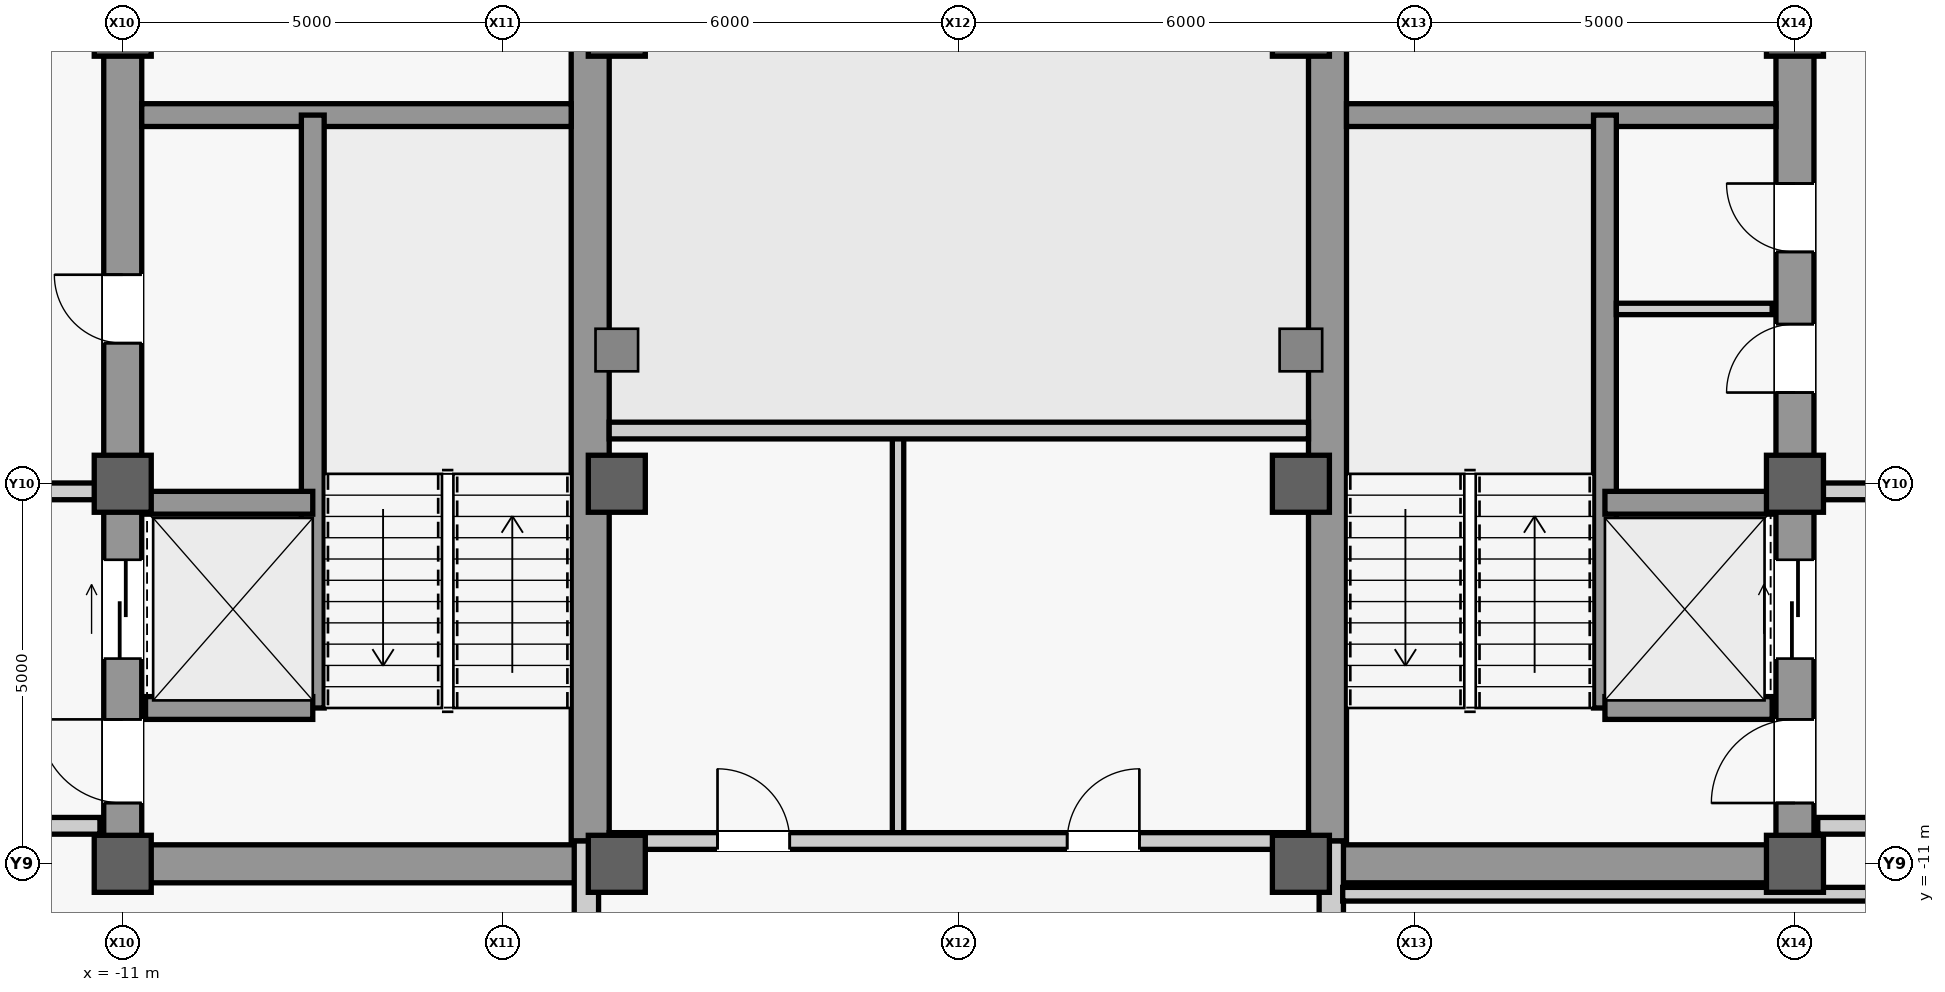
"""IFC4 building model, lengths in metres.
Left out: names, types, materials, properties, quantities, classifications, styles, units other than length and angle.
Written with IfcOpenShell. Run it as: python <this file> out.ifc"""

import sys

from ifc_helpers import new_model, si_unit, direction, frame, frame_2d, origin, origin_2d, place, context, subcontext, project, spatial, rectangle, extrude, source, transform, mapped, element, fill, save


model = new_model("IFC4")
c1 = context("Model", 3, precision=1e-05, world=origin(), true_north=direction((0.0, 1.0)))
c2 = subcontext(c1, "Body", "Model", "MODEL_VIEW")
j1 = project(units=[si_unit("LENGTHUNIT", "METRE"), si_unit("PLANEANGLEUNIT", "RADIAN")], contexts=[c1])
p1 = place(None, origin())
s1 = spatial("IfcSite", under=j1, at=p1, CompositionType="ELEMENT")
p2 = place(p1, origin())
s2 = spatial("IfcBuilding", under=s1, at=p2, CompositionType="ELEMENT")
p3 = place(p2, frame((0.0, 0.0, 346.3)))
s3 = spatial("IfcBuildingStorey", under=s2, at=p3, CompositionType="ELEMENT", Elevation=346.3)
m1 = source(origin(), c2, "Body", "SweptSolid", [
    extrude(rectangle(XDim=22.0, YDim=0.5, at=frame_2d((11.0, 0.0))), origin(), (0.0, 0.0, 1.0), 3.74),
])
p4 = place(p3, frame((-11.0, -11.0, 0.0), z_axis=(0.0, 0.0, 1.0), x_axis=(0.0, 1.0, 0.0)))
e1 = element("IfcWall", 1, at=p4, inside=s3, PredefinedType="SHEAR", context=c2, shape_type="MappedRepresentation", body=[
    mapped(m1, transform((0.0, 0.0, 0.0), scale=1.0)),
])
m2 = source(origin(), c2, "Body", "SweptSolid", [
    extrude(rectangle(XDim=1.1, YDim=2.2, at=frame_2d((0.55, 1.1))), frame((0.0, 0.26, 0.0), z_axis=(0.0, -1.0, 0.0), x_axis=(1.0, 0.0, 0.0)), (0.0, 0.0, 1.0), 0.52),
])
p5 = place(p4, frame((0.8, 0.0, 0.0)))
e2 = element("IfcOpeningElement", 2, at=p5, cuts=e1, PredefinedType="OPENING", context=c2, shape_type="MappedRepresentation", body=[
    mapped(m2, transform((0.0, 0.0, 0.0), scale=1.0)),
])
p6 = place(p4, frame((12.5, 0.0, 0.0)))
e3 = element("IfcOpeningElement", 3, at=p6, cuts=e1, PredefinedType="OPENING", context=c2, shape_type="MappedRepresentation", body=[
    mapped(m2, transform((0.0, 0.0, 0.0), scale=1.0)),
])
m3 = source(origin(), c2, "Body", "SweptSolid", [
    extrude(rectangle(XDim=0.9, YDim=2.15, at=frame_2d((0.45, 1.075))), frame((0.0, 0.26, 0.0), z_axis=(0.0, -1.0, 0.0), x_axis=(1.0, 0.0, 0.0)), (0.0, 0.0, 1.0), 0.52),
])
p7 = place(p4, frame((6.85, 0.0, 0.0)))
e4 = element("IfcOpeningElement", 4, at=p7, cuts=e1, PredefinedType="OPENING", context=c2, shape_type="MappedRepresentation", body=[
    mapped(m3, transform((0.0, 0.0, 0.0), scale=1.0)),
])
m4 = source(origin(), c2, "Body", "SweptSolid", [
    extrude(rectangle(XDim=1.2, YDim=2.3, at=frame_2d((0.6, 1.15))), frame((0.0, 0.26, 0.0), z_axis=(0.0, -1.0, 0.0), x_axis=(1.0, 0.0, 0.0)), (0.0, 0.0, 1.0), 0.52),
])
p8 = place(p4, frame((14.6, 0.0, 0.0)))
e5 = element("IfcOpeningElement", 5, at=p8, cuts=e1, PredefinedType="OPENING", context=c2, shape_type="MappedRepresentation", body=[
    mapped(m4, transform((0.0, 0.0, 0.0), scale=1.0)),
])
p9 = place(p4, frame((18.2, 0.0, 0.0)))
e6 = element("IfcOpeningElement", 6, at=p9, cuts=e1, PredefinedType="OPENING", context=c2, shape_type="MappedRepresentation", body=[
    mapped(m4, transform((0.0, 0.0, 0.0), scale=1.0)),
])
m5 = source(origin(), c2, "Body", "SweptSolid", [
    extrude(rectangle(XDim=1.3, YDim=2.3, at=frame_2d((0.65, 1.15))), frame((0.0, 0.26, 0.0), z_axis=(0.0, -1.0, 0.0), x_axis=(1.0, 0.0, 0.0)), (0.0, 0.0, 1.0), 0.52),
])
p10 = place(p4, frame((2.7, 0.0, 0.0)))
e7 = element("IfcOpeningElement", 7, at=p10, cuts=e1, PredefinedType="OPENING", context=c2, shape_type="MappedRepresentation", body=[
    mapped(m5, transform((0.0, 0.0, 0.0), scale=1.0)),
])
p11 = place(p3, frame((11.0, -11.0, 0.0), z_axis=(0.0, 0.0, 1.0), x_axis=(0.0, 1.0, 0.0)))
e8 = element("IfcWall", 8, at=p11, inside=s3, PredefinedType="SHEAR", context=c2, shape_type="MappedRepresentation", body=[
    mapped(m1, transform((0.0, 0.0, 0.0), scale=1.0)),
])
p12 = place(p11, frame((0.8, 0.0, 0.0)))
e9 = element("IfcOpeningElement", 9, at=p12, cuts=e8, PredefinedType="OPENING", context=c2, shape_type="MappedRepresentation", body=[
    mapped(m2, transform((0.0, 0.0, 0.0), scale=1.0)),
])
p13 = place(p11, frame((6.2, 0.0, 0.0)))
e10 = element("IfcOpeningElement", 10, at=p13, cuts=e8, PredefinedType="OPENING", context=c2, shape_type="MappedRepresentation", body=[
    mapped(m3, transform((0.0, 0.0, 0.0), scale=1.0)),
])
p14 = place(p11, frame((8.05, 0.0, 0.0)))
e11 = element("IfcOpeningElement", 11, at=p14, cuts=e8, PredefinedType="OPENING", context=c2, shape_type="MappedRepresentation", body=[
    mapped(m3, transform((0.0, 0.0, 0.0), scale=1.0)),
])
p15 = place(p11, frame((17.6, 0.0, 0.0)))
e12 = element("IfcOpeningElement", 12, at=p15, cuts=e8, PredefinedType="OPENING", context=c2, shape_type="MappedRepresentation", body=[
    mapped(m4, transform((0.0, 0.0, 0.0), scale=1.0)),
])
p16 = place(p11, frame((19.6, 0.0, 0.0)))
e13 = element("IfcOpeningElement", 13, at=p16, cuts=e8, PredefinedType="OPENING", context=c2, shape_type="MappedRepresentation", body=[
    mapped(m4, transform((0.0, 0.0, 0.0), scale=1.0)),
])
p17 = place(p11, frame((2.7, 0.0, 0.0)))
e14 = element("IfcOpeningElement", 14, at=p17, cuts=e8, PredefinedType="OPENING", context=c2, shape_type="MappedRepresentation", body=[
    mapped(m5, transform((0.0, 0.0, 0.0), scale=1.0)),
])
p18 = place(p11, frame((13.35, 0.0, 0.0)))
e15 = element("IfcOpeningElement", 15, at=p18, cuts=e8, PredefinedType="OPENING", context=c2, shape_type="MappedRepresentation", body=[
    mapped(m5, transform((0.0, 0.0, 0.0), scale=1.0)),
])
m6 = source(origin(), c2, "Body", "SweptSolid", [
    extrude(rectangle(XDim=21.4, YDim=0.5, at=frame_2d((10.7, 0.0))), origin(), (0.0, 0.0, 1.0), 3.74),
])
for number, where, z_axis, x_axis in (
    (16, (-4.85, -10.7, 0.0), (0.0, 0.0, 1.0), (0.0, 1.0, 0.0)),
    (17, (4.85, -10.7, 0.0), (0.0, 0.0, 1.0), (0.0, 1.0, 0.0)),
):
    element("IfcWall", number, at=place(p3, frame(where, z_axis=z_axis, x_axis=x_axis)), inside=s3, PredefinedType="SHEAR", context=c2, shape_type="MappedRepresentation", body=[
        mapped(m6, transform((0.0, 0.0, 0.0), scale=1.0)),
    ])
m7 = source(origin(), c2, "Body", "SweptSolid", [
    extrude(rectangle(XDim=5.9, YDim=0.5, at=frame_2d((2.95, 0.0))), origin(), (0.0, 0.0, 1.0), 3.74),
])
for number, where, z_axis, x_axis in (
    (18, (-10.75, -11.0, 0.0), (0.0, 0.0, 1.0), (1.0, 0.0, 0.0)),
    (19, (4.85, -11.0, 0.0), (0.0, 0.0, 1.0), (1.0, 0.0, 0.0)),
):
    element("IfcWall", number, at=place(p3, frame(where, z_axis=z_axis, x_axis=x_axis)), inside=s3, PredefinedType="SHEAR", context=c2, shape_type="MappedRepresentation", body=[
        mapped(m7, transform((0.0, 0.0, 0.0), scale=1.0)),
    ])
m8 = source(origin(), c2, "Body", "SweptSolid", [
    extrude(rectangle(XDim=5.65, YDim=0.3, at=frame_2d((2.825, 0.0))), origin(), (0.0, 0.0, 1.0), 3.74),
])
for number, where, z_axis, x_axis in (
    (20, (-10.75, -1.15, 0.0), (0.0, 0.0, 1.0), (1.0, 0.0, 0.0)),
    (21, (5.1, -1.15, 0.0), (0.0, 0.0, 1.0), (1.0, 0.0, 0.0)),
):
    element("IfcWall", number, at=place(p3, frame(where, z_axis=z_axis, x_axis=x_axis)), inside=s3, PredefinedType="SHEAR", context=c2, shape_type="MappedRepresentation", body=[
        mapped(m8, transform((0.0, 0.0, 0.0), scale=1.0)),
    ])
m9 = source(origin(), c2, "Body", "SweptSolid", [
    extrude(rectangle(XDim=0.75, YDim=0.75, at=origin_2d()), origin(), (0.0, 0.0, 1.0), 4.0),
])
for number, where, z_axis, x_axis in (
    (22, (-11.0, -11.0, 0.0), (0.0, 0.0, 1.0), (1.0, 0.0, 0.0)),
    (23, (-11.0, -6.0, 0.0), (0.0, 0.0, 1.0), (1.0, 0.0, 0.0)),
    (24, (-11.0, 0.0, 0.0), (0.0, 0.0, 1.0), (1.0, 0.0, 0.0)),
    (25, (-4.5, -11.0, 0.0), (0.0, 0.0, 1.0), (1.0, 0.0, 0.0)),
    (26, (-4.5, -6.0, 0.0), (0.0, 0.0, 1.0), (1.0, 0.0, 0.0)),
    (27, (-4.5, 0.0, 0.0), (0.0, 0.0, 1.0), (1.0, 0.0, 0.0)),
    (28, (4.5, -11.0, 0.0), (0.0, 0.0, 1.0), (1.0, 0.0, 0.0)),
    (29, (4.5, -6.0, 0.0), (0.0, 0.0, 1.0), (1.0, 0.0, 0.0)),
    (30, (4.5, 0.0, 0.0), (0.0, 0.0, 1.0), (1.0, 0.0, 0.0)),
    (31, (11.0, -11.0, 0.0), (0.0, 0.0, 1.0), (1.0, 0.0, 0.0)),
    (32, (11.0, -6.0, 0.0), (0.0, 0.0, 1.0), (1.0, 0.0, 0.0)),
    (33, (11.0, 0.0, 0.0), (0.0, 0.0, 1.0), (1.0, 0.0, 0.0)),
):
    element("IfcColumn", number, at=place(p3, frame(where, z_axis=z_axis, x_axis=x_axis)), inside=s3, PredefinedType="COLUMN", context=c2, shape_type="MappedRepresentation", body=[
        mapped(m9, transform((0.0, 0.0, 0.0), scale=1.0)),
    ])
m10 = source(origin(), c2, "Body", "SweptSolid", [
    extrude(rectangle(XDim=14.98, YDim=0.32, at=frame_2d((7.49, 0.0))), origin(), (0.0, 0.0, 1.0), 3.045),
])
for number, where, z_axis, x_axis in (
    (34, (-4.9, -25.68, 0.0), (0.0, 0.0, 1.0), (0.0, 1.0, 0.0)),
    (35, (4.9, -25.68, 0.0), (0.0, 0.0, 1.0), (0.0, 1.0, 0.0)),
):
    element("IfcWall", number, at=place(p3, frame(where, z_axis=z_axis, x_axis=x_axis)), inside=s3, PredefinedType="STANDARD", context=c2, shape_type="MappedRepresentation", body=[
        mapped(m10, transform((0.0, 0.0, 0.0), scale=1.0)),
    ])
m11 = source(origin(), c2, "Body", "SweptSolid", [
    extrude(rectangle(XDim=7.8, YDim=0.3, at=frame_2d((3.9, 0.0))), origin(), (0.0, 0.0, 1.0), 3.74),
])
p19 = place(p3, frame((-8.5, -8.95, 0.0), z_axis=(0.0, 0.0, 1.0), x_axis=(0.0, 1.0, 0.0)))
e36 = element("IfcWall", 36, at=p19, inside=s3, PredefinedType="SHEAR", context=c2, shape_type="MappedRepresentation", body=[
    mapped(m11, transform((0.0, 0.0, 0.0), scale=1.0)),
])
m12 = source(origin(), c2, "Body", "SweptSolid", [
    extrude(rectangle(XDim=2.2, YDim=0.3, at=frame_2d((1.1, 0.0))), origin(), (0.0, 0.0, 1.0), 3.74),
])
for number, where, z_axis, x_axis in (
    (37, (-10.7, -8.95, 0.0), (0.0, 0.0, 1.0), (1.0, 0.0, 0.0)),
    (38, (-10.7, -6.25, 0.0), (0.0, 0.0, 1.0), (1.0, 0.0, 0.0)),
):
    element("IfcWall", number, at=place(p3, frame(where, z_axis=z_axis, x_axis=x_axis)), inside=s3, PredefinedType="SHEAR", context=c2, shape_type="MappedRepresentation", body=[
        mapped(m12, transform((0.0, 0.0, 0.0), scale=1.0)),
    ])
p20 = place(p3, frame((8.5, -8.95, 0.0), z_axis=(0.0, 0.0, 1.0), x_axis=(0.0, 1.0, 0.0)))
e39 = element("IfcWall", 39, at=p20, inside=s3, PredefinedType="SHEAR", context=c2, shape_type="MappedRepresentation", body=[
    mapped(m11, transform((0.0, 0.0, 0.0), scale=1.0)),
])
for number, where, z_axis, x_axis in (
    (40, (8.5, -8.95, 0.0), (0.0, 0.0, 1.0), (1.0, 0.0, 0.0)),
    (41, (8.5, -6.25, 0.0), (0.0, 0.0, 1.0), (1.0, 0.0, 0.0)),
):
    element("IfcWall", number, at=place(p3, frame(where, z_axis=z_axis, x_axis=x_axis)), inside=s3, PredefinedType="SHEAR", context=c2, shape_type="MappedRepresentation", body=[
        mapped(m12, transform((0.0, 0.0, 0.0), scale=1.0)),
    ])
m13 = source(origin(), c2, "Body", "SweptSolid", [
    extrude(rectangle(XDim=2.05, YDim=0.15, at=frame_2d((1.025, 0.0))), origin(), (0.0, 0.0, 1.0), 3.74),
])
p21 = place(p3, frame((8.65, -3.7, 0.0), z_axis=(0.0, 0.0, 1.0), x_axis=(1.0, 0.0, 0.0)))
e42 = element("IfcWall", 42, at=p21, inside=s3, PredefinedType="PARTITIONING", context=c2, shape_type="MappedRepresentation", body=[
    mapped(m13, transform((0.0, 0.0, 0.0), scale=1.0)),
])
m14 = source(origin(), c2, "Body", "SweptSolid", [
    extrude(rectangle(XDim=4.05, YDim=0.22, at=frame_2d((2.025, 0.0))), origin(), (0.0, 0.0, 1.0), 3.74),
])
p22 = place(p3, frame((-15.35, -10.5, 0.0), z_axis=(0.0, 0.0, 1.0), x_axis=(1.0, 0.0, 0.0)))
e43 = element("IfcWall", 43, at=p22, inside=s3, PredefinedType="PARTITIONING", context=c2, shape_type="MappedRepresentation", body=[
    mapped(m14, transform((0.0, 0.0, 0.0), scale=1.0)),
])
m15 = source(origin(), c2, "Body", "SweptSolid", [
    extrude(rectangle(XDim=4.05, YDim=0.22, at=frame_2d((2.025, 0.0))), origin(), (0.0, 0.0, 1.0), 3.124),
])
p23 = place(p3, frame((-15.35, -6.1, 0.0), z_axis=(0.0, 0.0, 1.0), x_axis=(1.0, 0.0, 0.0)))
e44 = element("IfcWall", 44, at=p23, inside=s3, PredefinedType="PARTITIONING", context=c2, shape_type="MappedRepresentation", body=[
    mapped(m15, transform((0.0, 0.0, 0.0), scale=1.0)),
])
p24 = place(p3, frame((11.3, -10.5, 0.0), z_axis=(0.0, 0.0, 1.0), x_axis=(1.0, 0.0, 0.0)))
e45 = element("IfcWall", 45, at=p24, inside=s3, PredefinedType="PARTITIONING", context=c2, shape_type="MappedRepresentation", body=[
    mapped(m14, transform((0.0, 0.0, 0.0), scale=1.0)),
])
p25 = place(p3, frame((11.3, -6.1, 0.0), z_axis=(0.0, 0.0, 1.0), x_axis=(1.0, 0.0, 0.0)))
e46 = element("IfcWall", 46, at=p25, inside=s3, PredefinedType="PARTITIONING", context=c2, shape_type="MappedRepresentation", body=[
    mapped(m15, transform((0.0, 0.0, 0.0), scale=1.0)),
])
m16 = source(origin(), c2, "Body", "SweptSolid", [
    extrude(rectangle(XDim=5.4, YDim=0.15, at=frame_2d((2.7, 0.0))), origin(), (0.0, 0.0, 1.0), 3.74),
])
p26 = place(p3, frame((-0.8, -10.7, 0.0), z_axis=(0.0, 0.0, 1.0), x_axis=(0.0, 1.0, 0.0)))
e47 = element("IfcWall", 47, at=p26, inside=s3, PredefinedType="PARTITIONING", context=c2, shape_type="MappedRepresentation", body=[
    mapped(m16, transform((0.0, 0.0, 0.0), scale=1.0)),
])
m17 = source(origin(), c2, "Body", "SweptSolid", [
    extrude(rectangle(XDim=9.2, YDim=0.22, at=frame_2d((4.6, 0.0))), origin(), (0.0, 0.0, 1.0), 3.74),
])
p27 = place(p3, frame((-4.6, -10.7, 0.0), z_axis=(0.0, 0.0, 1.0), x_axis=(1.0, 0.0, 0.0)))
e48 = element("IfcWall", 48, at=p27, inside=s3, PredefinedType="PARTITIONING", context=c2, shape_type="MappedRepresentation", body=[
    mapped(m17, transform((0.0, 0.0, 0.0), scale=1.0)),
])
m18 = source(origin(), c2, "Body", "SweptSolid", [
    extrude(rectangle(XDim=0.95, YDim=2.15, at=frame_2d((0.475, 1.075))), frame((0.0, 0.12, 0.0), z_axis=(0.0, -1.0, 0.0), x_axis=(1.0, 0.0, 0.0)), (0.0, 0.0, 1.0), 0.24),
])
p28 = place(p27, frame((1.425, 0.0, 0.0)))
e49 = element("IfcOpeningElement", 49, at=p28, cuts=e48, PredefinedType="OPENING", context=c2, shape_type="MappedRepresentation", body=[
    mapped(m18, transform((0.0, 0.0, 0.0), scale=1.0)),
])
p29 = place(p27, frame((6.025, 0.0, 0.0)))
e50 = element("IfcOpeningElement", 50, at=p29, cuts=e48, PredefinedType="OPENING", context=c2, shape_type="MappedRepresentation", body=[
    mapped(m18, transform((0.0, 0.0, 0.0), scale=1.0)),
])
p30 = place(p3, frame((-4.6, -5.3, 0.0), z_axis=(0.0, 0.0, 1.0), x_axis=(1.0, 0.0, 0.0)))
e51 = element("IfcWall", 51, at=p30, inside=s3, PredefinedType="PARTITIONING", context=c2, shape_type="MappedRepresentation", body=[
    mapped(m17, transform((0.0, 0.0, 0.0), scale=1.0)),
])
m19 = source(origin(), c2, "Body", "SweptSolid", [
    extrude(rectangle(XDim=12.7, YDim=0.18, at=frame_2d((6.35, 0.0))), origin(), (0.0, 0.0, 1.0), 2.79),
])
p31 = place(p3, frame((5.05, -11.4, 0.0), z_axis=(0.0, 0.0, 1.0), x_axis=(1.0, 0.0, 0.0)))
e52 = element("IfcWall", 52, at=p31, inside=s3, PredefinedType="PARTITIONING", context=c2, shape_type="MappedRepresentation", body=[
    mapped(m19, transform((0.0, 0.0, 0.0), scale=1.0)),
])
m20 = source(origin(), c2, "Body", "SweptSolid", [
    extrude(rectangle(XDim=1.05, YDim=2.2, at=frame_2d((0.525, 1.1))), frame((0.0, 0.1, 0.0), z_axis=(0.0, -1.0, 0.0), x_axis=(1.0, 0.0, 0.0)), (0.0, 0.0, 1.0), 0.2),
])
p32 = place(p31, frame((10.975, 0.0, 0.0)))
e53 = element("IfcOpeningElement", 53, at=p32, cuts=e52, PredefinedType="OPENING", context=c2, shape_type="MappedRepresentation", body=[
    mapped(m20, transform((0.0, 0.0, 0.0), scale=1.0)),
])
m21 = source(origin(), c2, "Body", "SweptSolid", [
    extrude(rectangle(XDim=1.1, YDim=2.2, at=frame_2d((0.55, 1.1))), frame((0.0, 0.025, 0.0), z_axis=(0.0, -1.0, 0.0), x_axis=(1.0, 0.0, 0.0)), (0.0, 0.0, 1.0), 0.05),
])
p33 = place(p5, origin())
e54 = element("IfcDoor", 54, at=p33, inside=s3, OperationType="SINGLE_SWING_RIGHT", PredefinedType="DOOR", context=c2, shape_type="MappedRepresentation", body=[
    mapped(m21, transform((0.0, 0.0, 0.0), scale=1.0)),
])
fill(e2, e54)
p34 = place(p12, origin())
e55 = element("IfcDoor", 55, at=p34, inside=s3, OperationType="SINGLE_SWING_LEFT", PredefinedType="DOOR", context=c2, shape_type="MappedRepresentation", body=[
    mapped(m21, transform((0.0, 0.0, 0.0), scale=1.0)),
])
fill(e9, e55)
m22 = source(origin(), c2, "Body", "SweptSolid", [
    extrude(rectangle(XDim=0.9, YDim=2.15, at=frame_2d((0.45, 1.075))), frame((0.0, 0.025, 0.0), z_axis=(0.0, -1.0, 0.0), x_axis=(1.0, 0.0, 0.0)), (0.0, 0.0, 1.0), 0.05),
])
p35 = place(p7, origin())
e56 = element("IfcDoor", 56, at=p35, inside=s3, OperationType="SINGLE_SWING_RIGHT", PredefinedType="DOOR", context=c2, shape_type="MappedRepresentation", body=[
    mapped(m22, transform((0.0, 0.0, 0.0), scale=1.0)),
])
fill(e4, e56)
p36 = place(p13, origin())
e57 = element("IfcDoor", 57, at=p36, inside=s3, OperationType="SINGLE_SWING_LEFT", PredefinedType="DOOR", context=c2, shape_type="MappedRepresentation", body=[
    mapped(m22, transform((0.0, 0.0, 0.0), scale=1.0)),
])
fill(e10, e57)
p37 = place(p14, origin())
e58 = element("IfcDoor", 58, at=p37, inside=s3, OperationType="SINGLE_SWING_RIGHT", PredefinedType="DOOR", context=c2, shape_type="MappedRepresentation", body=[
    mapped(m22, transform((0.0, 0.0, 0.0), scale=1.0)),
])
fill(e11, e58)
m23 = source(origin(), c2, "Body", "SweptSolid", [
    extrude(rectangle(XDim=0.95, YDim=2.15, at=frame_2d((0.475, 1.075))), frame((0.0, 0.025, 0.0), z_axis=(0.0, -1.0, 0.0), x_axis=(1.0, 0.0, 0.0)), (0.0, 0.0, 1.0), 0.05),
])
p38 = place(p28, origin())
e59 = element("IfcDoor", 59, at=p38, inside=s3, OperationType="SINGLE_SWING_LEFT", PredefinedType="DOOR", context=c2, shape_type="MappedRepresentation", body=[
    mapped(m23, transform((0.0, 0.0, 0.0), scale=1.0)),
])
fill(e49, e59)
p39 = place(p29, origin())
e60 = element("IfcDoor", 60, at=p39, inside=s3, OperationType="SINGLE_SWING_RIGHT", PredefinedType="DOOR", context=c2, shape_type="MappedRepresentation", body=[
    mapped(m23, transform((0.0, 0.0, 0.0), scale=1.0)),
])
fill(e50, e60)
m24 = source(origin(), c2, "Body", "SweptSolid", [
    extrude(rectangle(XDim=1.3, YDim=2.3, at=frame_2d((0.65, 1.15))), frame((0.0, 0.025, 0.0), z_axis=(0.0, -1.0, 0.0), x_axis=(1.0, 0.0, 0.0)), (0.0, 0.0, 1.0), 0.05),
])
p40 = place(p10, origin())
e61 = element("IfcDoor", 61, at=p40, inside=s3, OperationType="SLIDING_TO_LEFT", PredefinedType="DOOR", context=c2, shape_type="MappedRepresentation", body=[
    mapped(m24, transform((0.0, 0.0, 0.0), scale=1.0)),
])
fill(e7, e61)
p41 = place(p17, origin())
e62 = element("IfcDoor", 62, at=p41, inside=s3, OperationType="SLIDING_TO_LEFT", PredefinedType="DOOR", context=c2, shape_type="MappedRepresentation", body=[
    mapped(m24, transform((0.0, 0.0, 0.0), scale=1.0)),
])
fill(e14, e62)
save(model, sys.argv[1])
